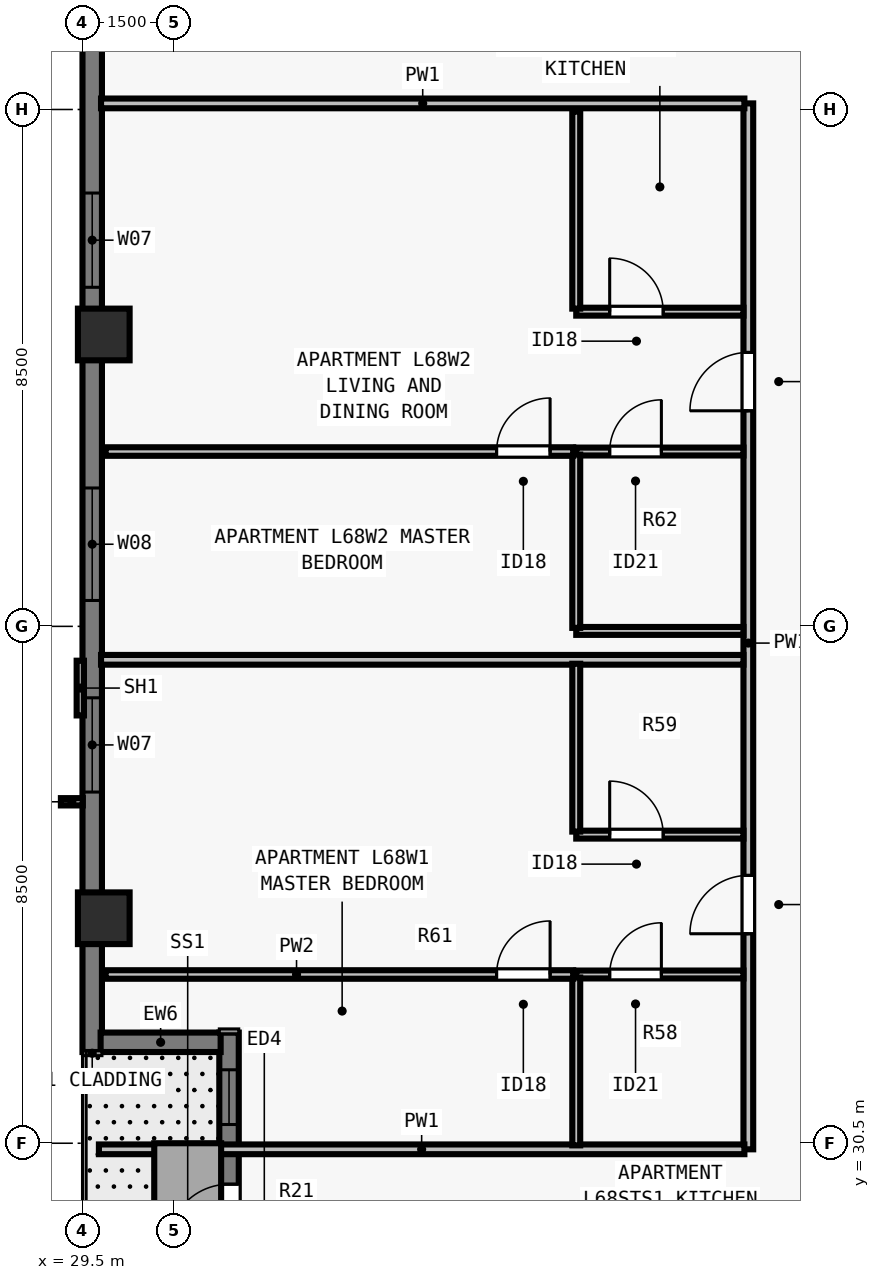
"""IFC4 building model, lengths in metres.
Left out: names, types, materials, properties, quantities, classifications, styles, units other than length and angle.
Written with IfcOpenShell. Run it as: python <this file> out.ifc"""

import sys

from ifc_helpers import new_model, si_unit, direction, frame, frame_2d, origin, origin_2d, place, context, subcontext, project, spatial, rectangle, extrude, element, fill, save


model = new_model("IFC4")
c1 = context("Model", 3, precision=1e-05, world=origin(), true_north=direction((0.0, 1.0)))
c2 = subcontext(c1, "Body", "Model", "MODEL_VIEW")
j1 = project(units=[si_unit("LENGTHUNIT", "METRE"), si_unit("PLANEANGLEUNIT", "RADIAN")], contexts=[c1])
p1 = place(None, origin())
s1 = spatial("IfcSite", under=j1, at=p1, CompositionType="ELEMENT")
p2 = place(p1, origin())
s2 = spatial("IfcBuilding", under=s1, at=p2, CompositionType="ELEMENT")
p3 = place(p2, frame((0.0, 0.0, 248.0)))
s3 = spatial("IfcBuildingStorey", under=s2, at=p3, CompositionType="ELEMENT", Elevation=248.0)
for number, where, z_axis, x_axis in (
    (1, (29.85, 43.8, 0.0), (0.0, 0.0, 1.0), (0.0, 1.0, 0.0)),
    (2, (29.85, 34.2, 0.0), (0.0, 0.0, 1.0), (0.0, 1.0, 0.0)),
):
    element("IfcColumn", number, at=place(p3, frame(where, z_axis=z_axis, x_axis=x_axis)), inside=s3, PredefinedType="COLUMN", context=c2, shape_type="SweptSolid", body=[
        extrude(rectangle(XDim=0.85, YDim=0.85, at=origin_2d()), origin(), (0.0, 0.0, 1.0), 3.5),
    ])
p4 = place(p3, frame((29.66, 32.0, 0.0), z_axis=(0.0, 0.0, 1.0), x_axis=(0.0, 1.0, 0.0)))
e3 = element("IfcWall", 3, at=p4, inside=s3, PredefinedType="SOLIDWALL", context=c2, shape_type="SweptSolid", body=[
    extrude(rectangle(XDim=24.202, YDim=0.32, at=frame_2d((12.101, 0.0))), origin(), (0.0, 0.0, 1.0), 3.29),
])
p5 = place(p4, frame((4.275, 0.0, 0.8)))
e4 = element("IfcOpeningElement", 4, at=p5, cuts=e3, PredefinedType="OPENING", context=c2, shape_type="SweptSolid", body=[
    extrude(rectangle(XDim=1.55, YDim=1.678, at=frame_2d((0.775, 0.839))), frame((0.0, 0.17, 0.0), z_axis=(0.0, -1.0, 0.0), x_axis=(1.0, 0.0, 0.0)), (0.0, 0.0, 1.0), 0.34),
])
p6 = place(p4, frame((7.426, 0.0, 0.8)))
e5 = element("IfcOpeningElement", 5, at=p6, cuts=e3, PredefinedType="OPENING", context=c2, shape_type="SweptSolid", body=[
    extrude(rectangle(XDim=1.85, YDim=1.678, at=frame_2d((0.925, 0.839))), frame((0.0, 0.17, 0.0), z_axis=(0.0, -1.0, 0.0), x_axis=(1.0, 0.0, 0.0)), (0.0, 0.0, 1.0), 0.34),
])
p7 = place(p4, frame((12.576, 0.0, 0.8)))
e6 = element("IfcOpeningElement", 6, at=p7, cuts=e3, PredefinedType="OPENING", context=c2, shape_type="SweptSolid", body=[
    extrude(rectangle(XDim=1.55, YDim=1.678, at=frame_2d((0.775, 0.839))), frame((0.0, 0.17, 0.0), z_axis=(0.0, -1.0, 0.0), x_axis=(1.0, 0.0, 0.0)), (0.0, 0.0, 1.0), 0.34),
])
p8 = place(p4, frame((20.47, 0.0, 0.8)))
e7 = element("IfcOpeningElement", 7, at=p8, cuts=e3, PredefinedType="OPENING", context=c2, shape_type="SweptSolid", body=[
    extrude(rectangle(XDim=0.9, YDim=1.678, at=frame_2d((0.45, 0.839))), frame((0.0, 0.17, 0.0), z_axis=(0.0, -1.0, 0.0), x_axis=(1.0, 0.0, 0.0)), (0.0, 0.0, 1.0), 0.34),
])
p9 = place(p3, frame((31.91, 26.578, 0.0), z_axis=(0.0, 0.0, 1.0), x_axis=(0.0, 1.0, 0.0)))
e8 = element("IfcWall", 8, at=p9, inside=s3, PredefinedType="SOLIDWALL", context=c2, shape_type="SweptSolid", body=[
    extrude(rectangle(XDim=5.742, YDim=0.32, at=frame_2d((2.871, 0.0))), origin(), (0.0, 0.0, 1.0), 3.29),
])
p10 = place(p9, frame((2.248, 0.0, 0.0)))
e9 = element("IfcOpeningElement", 9, at=p10, cuts=e8, PredefinedType="OPENING", context=c2, shape_type="SweptSolid", body=[
    extrude(rectangle(XDim=1.0, YDim=2.15, at=frame_2d((0.5, 1.075))), frame((0.0, 0.17, 0.0), z_axis=(0.0, -1.0, 0.0), x_axis=(1.0, 0.0, 0.0)), (0.0, 0.0, 1.0), 0.34),
])
p11 = place(p9, frame((4.23, 0.0, 0.8)))
e10 = element("IfcOpeningElement", 10, at=p11, cuts=e8, PredefinedType="OPENING", context=c2, shape_type="SweptSolid", body=[
    extrude(rectangle(XDim=0.9, YDim=1.678, at=frame_2d((0.45, 0.839))), frame((0.0, 0.17, 0.0), z_axis=(0.0, -1.0, 0.0), x_axis=(1.0, 0.0, 0.0)), (0.0, 0.0, 1.0), 0.34),
])
p12 = place(p3, frame((31.772, 32.16, 0.0), z_axis=(0.0, 0.0, 1.0), x_axis=(-1.0, 0.0, 0.0)))
e11 = element("IfcWall", 11, at=p12, inside=s3, PredefinedType="SOLIDWALL", context=c2, shape_type="SweptSolid", body=[
    extrude(rectangle(XDim=1.974, YDim=0.32, at=frame_2d((0.987, 0.0))), origin(), (0.0, 0.0, 1.0), 3.29),
])
p13 = place(p3, frame((40.45, 30.4, 0.0), z_axis=(0.0, 0.0, 1.0), x_axis=(0.0, 1.0, 0.0)))
e12 = element("IfcWall", 12, at=p13, inside=s3, PredefinedType="PARTITIONING", context=c2, shape_type="SweptSolid", body=[
    extrude(rectangle(XDim=17.2, YDim=0.16, at=frame_2d((8.6, 0.0))), origin(), (0.0, 0.0, 1.0), 3.29),
])
p14 = place(p13, frame((3.545, 0.0, 0.0)))
e13 = element("IfcOpeningElement", 13, at=p14, cuts=e12, PredefinedType="OPENING", context=c2, shape_type="SweptSolid", body=[
    extrude(rectangle(XDim=0.96, YDim=2.18, at=frame_2d((0.48, 1.09))), frame((0.0, 0.09, 0.0), z_axis=(0.0, -1.0, 0.0), x_axis=(1.0, 0.0, 0.0)), (0.0, 0.0, 1.0), 0.18),
])
p15 = place(p13, frame((12.145, 0.0, 0.0)))
e14 = element("IfcOpeningElement", 14, at=p15, cuts=e12, PredefinedType="OPENING", context=c2, shape_type="SweptSolid", body=[
    extrude(rectangle(XDim=0.96, YDim=2.18, at=frame_2d((0.48, 1.09))), frame((0.0, 0.09, 0.0), z_axis=(0.0, -1.0, 0.0), x_axis=(1.0, 0.0, 0.0)), (0.0, 0.0, 1.0), 0.18),
])
p16 = place(p3, frame((29.77, 30.4, 0.0), z_axis=(0.0, 0.0, 1.0), x_axis=(1.0, 0.0, 0.0)))
e15 = element("IfcWall", 15, at=p16, inside=s3, PredefinedType="PARTITIONING", context=c2, shape_type="SweptSolid", body=[
    extrude(rectangle(XDim=10.615, YDim=0.16, at=frame_2d((5.308, 0.0))), origin(), (0.0, 0.0, 1.0), 3.29),
])
p17 = place(p3, frame((29.805, 47.6, 0.0), z_axis=(0.0, 0.0, 1.0), x_axis=(1.0, 0.0, 0.0)))
e16 = element("IfcWall", 16, at=p17, inside=s3, PredefinedType="PARTITIONING", context=c2, shape_type="SweptSolid", body=[
    extrude(rectangle(XDim=10.58, YDim=0.16, at=frame_2d((5.29, 0.0))), origin(), (0.0, 0.0, 1.0), 3.29),
])
p18 = place(p3, frame((29.805, 38.45, 0.0), z_axis=(0.0, 0.0, 1.0), x_axis=(1.0, 0.0, 0.0)))
e17 = element("IfcWall", 17, at=p18, inside=s3, PredefinedType="PARTITIONING", context=c2, shape_type="SweptSolid", body=[
    extrude(rectangle(XDim=10.565, YDim=0.16, at=frame_2d((5.283, 0.0))), origin(), (0.0, 0.0, 1.0), 2.958),
])
p19 = place(p3, frame((37.62, 33.275, 0.0), z_axis=(0.0, 0.0, 1.0), x_axis=(1.0, 0.0, 0.0)))
e18 = element("IfcWall", 18, at=p19, inside=s3, PredefinedType="PLUMBINGWALL", context=c2, shape_type="SweptSolid", body=[
    extrude(rectangle(XDim=2.75, YDim=0.13, at=frame_2d((1.375, 0.0))), origin(), (0.0, 0.0, 1.0), 3.29),
])
p20 = place(p19, frame((0.55, 0.0, 0.0)))
e19 = element("IfcOpeningElement", 19, at=p20, cuts=e18, PredefinedType="OPENING", context=c2, shape_type="SweptSolid", body=[
    extrude(rectangle(XDim=0.85, YDim=2.08, at=frame_2d((0.425, 1.04))), frame((0.0, 0.075, 0.0), z_axis=(0.0, -1.0, 0.0), x_axis=(1.0, 0.0, 0.0)), (0.0, 0.0, 1.0), 0.15),
])
p21 = place(p3, frame((37.62, 30.465, 0.0), z_axis=(0.0, 0.0, 1.0), x_axis=(0.0, 1.0, 0.0)))
e20 = element("IfcWall", 20, at=p21, inside=s3, PredefinedType="PLUMBINGWALL", context=c2, shape_type="SweptSolid", body=[
    extrude(rectangle(XDim=2.76, YDim=0.13, at=frame_2d((1.38, 0.0))), origin(), (0.0, 0.0, 1.0), 3.29),
])
p22 = place(p3, frame((37.62, 35.575, 0.0), z_axis=(0.0, 0.0, 1.0), x_axis=(1.0, 0.0, 0.0)))
e21 = element("IfcWall", 21, at=p22, inside=s3, PredefinedType="PLUMBINGWALL", context=c2, shape_type="SweptSolid", body=[
    extrude(rectangle(XDim=2.75, YDim=0.13, at=frame_2d((1.375, 0.0))), origin(), (0.0, 0.0, 1.0), 3.29),
])
p23 = place(p22, frame((0.55, 0.0, 0.0)))
e22 = element("IfcOpeningElement", 22, at=p23, cuts=e21, PredefinedType="OPENING", context=c2, shape_type="SweptSolid", body=[
    extrude(rectangle(XDim=0.88, YDim=2.1, at=frame_2d((0.44, 1.05))), frame((0.0, 0.075, 0.0), z_axis=(0.0, -1.0, 0.0), x_axis=(1.0, 0.0, 0.0)), (0.0, 0.0, 1.0), 0.15),
])
p24 = place(p3, frame((37.62, 35.625, 0.0), z_axis=(0.0, 0.0, 1.0), x_axis=(0.0, 1.0, 0.0)))
e23 = element("IfcWall", 23, at=p24, inside=s3, PredefinedType="PLUMBINGWALL", context=c2, shape_type="SweptSolid", body=[
    extrude(rectangle(XDim=2.76, YDim=0.13, at=frame_2d((1.38, 0.0))), origin(), (0.0, 0.0, 1.0), 3.29),
])
p25 = place(p3, frame((29.88, 33.275, 0.0), z_axis=(0.0, 0.0, 1.0), x_axis=(1.0, 0.0, 0.0)))
e24 = element("IfcWall", 24, at=p25, inside=s3, PredefinedType="PARTITIONING", context=c2, shape_type="SweptSolid", body=[
    extrude(rectangle(XDim=7.69, YDim=0.14, at=frame_2d((3.845, 0.0))), origin(), (0.0, 0.0, 1.0), 2.573),
])
p26 = place(p25, frame((6.43, 0.0, 0.0)))
e25 = element("IfcOpeningElement", 25, at=p26, cuts=e24, PredefinedType="OPENING", context=c2, shape_type="SweptSolid", body=[
    extrude(rectangle(XDim=0.88, YDim=2.1, at=frame_2d((0.44, 1.05))), frame((0.0, 0.08, 0.0), z_axis=(0.0, -1.0, 0.0), x_axis=(1.0, 0.0, 0.0)), (0.0, 0.0, 1.0), 0.16),
])
p27 = place(p3, frame((37.62, 38.925, 0.0), z_axis=(0.0, 0.0, 1.0), x_axis=(1.0, 0.0, 0.0)))
e26 = element("IfcWall", 26, at=p27, inside=s3, PredefinedType="PLUMBINGWALL", context=c2, shape_type="SweptSolid", body=[
    extrude(rectangle(XDim=2.75, YDim=0.13, at=frame_2d((1.375, 0.0))), origin(), (0.0, 0.0, 1.0), 3.29),
])
p28 = place(p3, frame((37.62, 41.875, 0.0), z_axis=(0.0, 0.0, 1.0), x_axis=(1.0, 0.0, 0.0)))
e27 = element("IfcWall", 27, at=p28, inside=s3, PredefinedType="PLUMBINGWALL", context=c2, shape_type="SweptSolid", body=[
    extrude(rectangle(XDim=2.75, YDim=0.13, at=frame_2d((1.375, 0.0))), origin(), (0.0, 0.0, 1.0), 2.958),
])
p29 = place(p28, frame((0.55, 0.0, 0.0)))
e28 = element("IfcOpeningElement", 28, at=p29, cuts=e27, PredefinedType="OPENING", context=c2, shape_type="SweptSolid", body=[
    extrude(rectangle(XDim=0.85, YDim=2.08, at=frame_2d((0.425, 1.04))), frame((0.0, 0.075, 0.0), z_axis=(0.0, -1.0, 0.0), x_axis=(1.0, 0.0, 0.0)), (0.0, 0.0, 1.0), 0.15),
])
p30 = place(p3, frame((37.62, 38.975, 0.0), z_axis=(0.0, 0.0, 1.0), x_axis=(0.0, 1.0, 0.0)))
e29 = element("IfcWall", 29, at=p30, inside=s3, PredefinedType="PLUMBINGWALL", context=c2, shape_type="SweptSolid", body=[
    extrude(rectangle(XDim=2.85, YDim=0.13, at=frame_2d((1.425, 0.0))), origin(), (0.0, 0.0, 1.0), 3.29),
])
p31 = place(p3, frame((37.62, 44.175, 0.0), z_axis=(0.0, 0.0, 1.0), x_axis=(1.0, 0.0, 0.0)))
e30 = element("IfcWall", 30, at=p31, inside=s3, PredefinedType="PLUMBINGWALL", context=c2, shape_type="SweptSolid", body=[
    extrude(rectangle(XDim=2.75, YDim=0.13, at=frame_2d((1.375, 0.0))), origin(), (0.0, 0.0, 1.0), 2.958),
])
p32 = place(p31, frame((0.55, 0.0, 0.0)))
e31 = element("IfcOpeningElement", 31, at=p32, cuts=e30, PredefinedType="OPENING", context=c2, shape_type="SweptSolid", body=[
    extrude(rectangle(XDim=0.88, YDim=2.1, at=frame_2d((0.44, 1.05))), frame((0.0, 0.075, 0.0), z_axis=(0.0, -1.0, 0.0), x_axis=(1.0, 0.0, 0.0)), (0.0, 0.0, 1.0), 0.15),
])
p33 = place(p3, frame((37.62, 44.225, 0.0), z_axis=(0.0, 0.0, 1.0), x_axis=(0.0, 1.0, 0.0)))
e32 = element("IfcWall", 32, at=p33, inside=s3, PredefinedType="PLUMBINGWALL", context=c2, shape_type="SweptSolid", body=[
    extrude(rectangle(XDim=3.24, YDim=0.13, at=frame_2d((1.62, 0.0))), origin(), (0.0, 0.0, 1.0), 3.29),
])
p34 = place(p3, frame((29.88, 41.875, 0.0), z_axis=(0.0, 0.0, 1.0), x_axis=(1.0, 0.0, 0.0)))
e33 = element("IfcWall", 33, at=p34, inside=s3, PredefinedType="PARTITIONING", context=c2, shape_type="SweptSolid", body=[
    extrude(rectangle(XDim=7.69, YDim=0.14, at=frame_2d((3.845, 0.0))), origin(), (0.0, 0.0, 1.0), 3.29),
])
p35 = place(p34, frame((6.43, 0.0, 0.0)))
e34 = element("IfcOpeningElement", 34, at=p35, cuts=e33, PredefinedType="OPENING", context=c2, shape_type="SweptSolid", body=[
    extrude(rectangle(XDim=0.88, YDim=2.1, at=frame_2d((0.44, 1.05))), frame((0.0, 0.08, 0.0), z_axis=(0.0, -1.0, 0.0), x_axis=(1.0, 0.0, 0.0)), (0.0, 0.0, 1.0), 0.16),
])
p36 = place(p5, origin())
e35 = element("IfcWindow", 35, at=p36, inside=s3, PartitioningType="SINGLE_PANEL", PredefinedType="WINDOW", context=c2, shape_type="SweptSolid", body=[
    extrude(rectangle(XDim=1.55, YDim=1.678, at=frame_2d((0.775, 0.839))), frame((0.0, -0.05, 0.0), z_axis=(0.0, -1.0, 0.0), x_axis=(1.0, 0.0, 0.0)), (0.0, 0.0, 1.0), 0.06),
])
fill(e4, e35)
p37 = place(p6, origin())
e36 = element("IfcWindow", 36, at=p37, inside=s3, PartitioningType="SINGLE_PANEL", PredefinedType="WINDOW", context=c2, shape_type="SweptSolid", body=[
    extrude(rectangle(XDim=1.85, YDim=1.678, at=frame_2d((0.925, 0.839))), frame((0.0, -0.05, 0.0), z_axis=(0.0, -1.0, 0.0), x_axis=(1.0, 0.0, 0.0)), (0.0, 0.0, 1.0), 0.06),
])
fill(e5, e36)
p38 = place(p7, origin())
e37 = element("IfcWindow", 37, at=p38, inside=s3, PartitioningType="SINGLE_PANEL", PredefinedType="WINDOW", context=c2, shape_type="SweptSolid", body=[
    extrude(rectangle(XDim=1.55, YDim=1.678, at=frame_2d((0.775, 0.839))), frame((0.0, -0.05, 0.0), z_axis=(0.0, -1.0, 0.0), x_axis=(1.0, 0.0, 0.0)), (0.0, 0.0, 1.0), 0.06),
])
fill(e6, e37)
p39 = place(p10, origin())
e38 = element("IfcDoor", 38, at=p39, inside=s3, OperationType="SINGLE_SWING_LEFT", PredefinedType="DOOR", context=c2, shape_type="SweptSolid", body=[
    extrude(rectangle(XDim=1.0, YDim=2.15, at=frame_2d((0.5, 1.075))), frame((0.0, 0.025, 0.0), z_axis=(0.0, -1.0, 0.0), x_axis=(1.0, 0.0, 0.0)), (0.0, 0.0, 1.0), 0.05),
])
fill(e9, e38)
p40 = place(p11, origin())
e39 = element("IfcWindow", 39, at=p40, inside=s3, PartitioningType="SINGLE_PANEL", PredefinedType="WINDOW", context=c2, shape_type="SweptSolid", body=[
    extrude(rectangle(XDim=0.9, YDim=1.678, at=frame_2d((0.45, 0.839))), frame((0.0, -0.04, 0.0), z_axis=(0.0, -1.0, 0.0), x_axis=(1.0, 0.0, 0.0)), (0.0, 0.0, 1.0), 0.06),
])
fill(e10, e39)
p41 = place(p20, origin())
e40 = element("IfcDoor", 40, at=p41, inside=s3, OperationType="SINGLE_SWING_RIGHT", PredefinedType="DOOR", context=c2, shape_type="SweptSolid", body=[
    extrude(rectangle(XDim=0.85, YDim=2.08, at=frame_2d((0.425, 1.04))), frame((0.0, 0.025, 0.0), z_axis=(0.0, -1.0, 0.0), x_axis=(1.0, 0.0, 0.0)), (0.0, 0.0, 1.0), 0.05),
])
fill(e19, e40)
p42 = place(p23, origin())
e41 = element("IfcDoor", 41, at=p42, inside=s3, OperationType="SINGLE_SWING_LEFT", PredefinedType="DOOR", context=c2, shape_type="SweptSolid", body=[
    extrude(rectangle(XDim=0.88, YDim=2.1, at=frame_2d((0.44, 1.05))), frame((0.0, 0.025, 0.0), z_axis=(0.0, -1.0, 0.0), x_axis=(1.0, 0.0, 0.0)), (0.0, 0.0, 1.0), 0.05),
])
fill(e22, e41)
p43 = place(p26, origin())
e42 = element("IfcDoor", 42, at=p43, inside=s3, OperationType="SINGLE_SWING_RIGHT", PredefinedType="DOOR", context=c2, shape_type="SweptSolid", body=[
    extrude(rectangle(XDim=0.88, YDim=2.1, at=frame_2d((0.44, 1.05))), frame((0.0, 0.025, 0.0), z_axis=(0.0, -1.0, 0.0), x_axis=(1.0, 0.0, 0.0)), (0.0, 0.0, 1.0), 0.05),
])
fill(e25, e42)
p44 = place(p14, origin())
e43 = element("IfcDoor", 43, at=p44, inside=s3, OperationType="SINGLE_SWING_LEFT", PredefinedType="DOOR", context=c2, shape_type="SweptSolid", body=[
    extrude(rectangle(XDim=0.96, YDim=2.18, at=frame_2d((0.48, 1.09))), frame((0.0, 0.025, 0.0), z_axis=(0.0, -1.0, 0.0), x_axis=(1.0, 0.0, 0.0)), (0.0, 0.0, 1.0), 0.05),
])
fill(e13, e43)
p45 = place(p29, origin())
e44 = element("IfcDoor", 44, at=p45, inside=s3, OperationType="SINGLE_SWING_RIGHT", PredefinedType="DOOR", context=c2, shape_type="SweptSolid", body=[
    extrude(rectangle(XDim=0.85, YDim=2.08, at=frame_2d((0.425, 1.04))), frame((0.0, 0.025, 0.0), z_axis=(0.0, -1.0, 0.0), x_axis=(1.0, 0.0, 0.0)), (0.0, 0.0, 1.0), 0.05),
])
fill(e28, e44)
p46 = place(p32, origin())
e45 = element("IfcDoor", 45, at=p46, inside=s3, OperationType="SINGLE_SWING_LEFT", PredefinedType="DOOR", context=c2, shape_type="SweptSolid", body=[
    extrude(rectangle(XDim=0.88, YDim=2.1, at=frame_2d((0.44, 1.05))), frame((0.0, 0.025, 0.0), z_axis=(0.0, -1.0, 0.0), x_axis=(1.0, 0.0, 0.0)), (0.0, 0.0, 1.0), 0.05),
])
fill(e31, e45)
p47 = place(p35, origin())
e46 = element("IfcDoor", 46, at=p47, inside=s3, OperationType="SINGLE_SWING_RIGHT", PredefinedType="DOOR", context=c2, shape_type="SweptSolid", body=[
    extrude(rectangle(XDim=0.88, YDim=2.1, at=frame_2d((0.44, 1.05))), frame((0.0, 0.025, 0.0), z_axis=(0.0, -1.0, 0.0), x_axis=(1.0, 0.0, 0.0)), (0.0, 0.0, 1.0), 0.05),
])
fill(e34, e46)
p48 = place(p15, origin())
e47 = element("IfcDoor", 47, at=p48, inside=s3, OperationType="SINGLE_SWING_LEFT", PredefinedType="DOOR", context=c2, shape_type="SweptSolid", body=[
    extrude(rectangle(XDim=0.96, YDim=2.18, at=frame_2d((0.48, 1.09))), frame((0.0, 0.025, 0.0), z_axis=(0.0, -1.0, 0.0), x_axis=(1.0, 0.0, 0.0)), (0.0, 0.0, 1.0), 0.05),
])
fill(e14, e47)
save(model, sys.argv[1])
